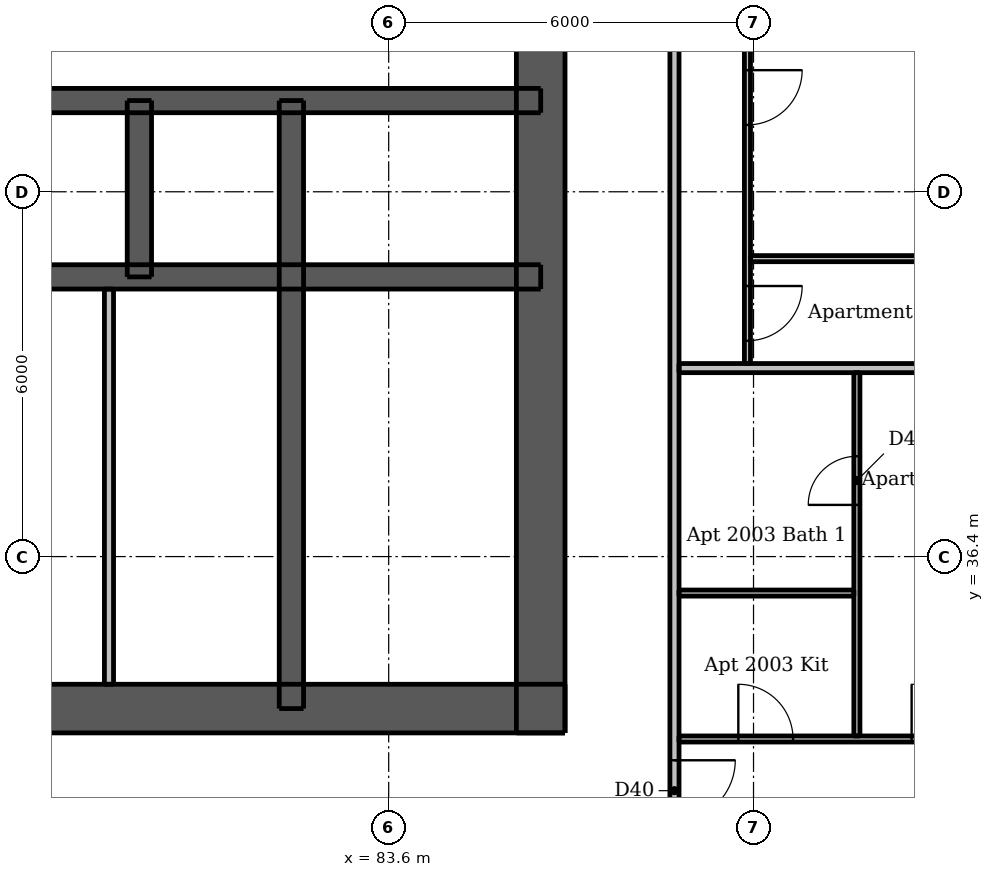
"""IFC4 building model, lengths in metres.
Left out: names, types, materials, properties, quantities, classifications, styles, units other than length and angle.
Written with IfcOpenShell. Run it as: python <this file> out.ifc"""

import sys

from ifc_helpers import new_model, si_unit, direction, frame, frame_2d, origin, place, context, subcontext, project, spatial, rectangle, extrude, element, fill, save


model = new_model("IFC4")
c1 = context("Model", 3, precision=1e-05, world=origin(), true_north=direction((0.0, 1.0)))
c2 = subcontext(c1, "Body", "Model", "MODEL_VIEW")
j1 = project(units=[si_unit("LENGTHUNIT", "METRE"), si_unit("PLANEANGLEUNIT", "RADIAN")], contexts=[c1])
p1 = place(None, origin())
s1 = spatial("IfcSite", under=j1, at=p1, CompositionType="ELEMENT")
p2 = place(p1, origin())
s2 = spatial("IfcBuilding", under=s1, at=p2, CompositionType="ELEMENT")
p3 = place(p2, frame((0.0, 0.0, 78.7)))
s3 = spatial("IfcBuildingStorey", under=s2, at=p3, CompositionType="ELEMENT", Elevation=78.7)
p4 = place(p3, frame((62.5, 33.9, 0.0), z_axis=(0.0, 0.0, 1.0), x_axis=(1.0, 0.0, 0.0)))
e1 = element("IfcWall", 1, at=p4, inside=s3, PredefinedType="SHEAR", context=c2, shape_type="SweptSolid", body=[
    extrude(rectangle(XDim=24.0, YDim=0.8, at=frame_2d((12.0, 0.0))), origin(), (0.0, 0.0, 1.0), 3.05),
])
p5 = place(p4, frame((2.0, 0.0, 0.0)))
e2 = element("IfcOpeningElement", 2, at=p5, cuts=e1, PredefinedType="OPENING", context=c2, shape_type="SweptSolid", body=[
    extrude(rectangle(XDim=1.1, YDim=2.1, at=frame_2d((0.55, 1.05))), frame((0.0, 0.41, 0.0), z_axis=(0.0, -1.0, 0.0), x_axis=(1.0, 0.0, 0.0)), (0.0, 0.0, 1.0), 0.82),
])
p6 = place(p4, frame((20.9, 0.0, 0.0)))
e3 = element("IfcOpeningElement", 3, at=p6, cuts=e1, PredefinedType="OPENING", context=c2, shape_type="SweptSolid", body=[
    extrude(rectangle(XDim=1.1, YDim=2.1, at=frame_2d((0.55, 1.05))), frame((0.0, 0.41, 0.0), z_axis=(0.0, -1.0, 0.0), x_axis=(1.0, 0.0, 0.0)), (0.0, 0.0, 1.0), 0.82),
])
p7 = place(p4, frame((8.0, 0.0, 0.0)))
e4 = element("IfcOpeningElement", 4, at=p7, cuts=e1, PredefinedType="OPENING", context=c2, shape_type="SweptSolid", body=[
    extrude(rectangle(XDim=1.1, YDim=2.1, at=frame_2d((0.55, 1.05))), frame((0.0, 0.41, 0.0), z_axis=(0.0, -1.0, 0.0), x_axis=(1.0, 0.0, 0.0)), (0.0, 0.0, 1.0), 0.82),
])
p8 = place(p4, frame((17.488, 0.0, 0.0)))
e5 = element("IfcOpeningElement", 5, at=p8, cuts=e1, PredefinedType="OPENING", context=c2, shape_type="SweptSolid", body=[
    extrude(rectangle(XDim=0.9, YDim=2.1, at=frame_2d((0.45, 1.05))), frame((0.0, 0.41, 0.0), z_axis=(0.0, -1.0, 0.0), x_axis=(1.0, 0.0, 0.0)), (0.0, 0.0, 1.0), 0.82),
])
p9 = place(p3, frame((86.1, 33.5, 0.0), z_axis=(0.0, 0.0, 1.0), x_axis=(0.0, 1.0, 0.0)))
e6 = element("IfcWall", 6, at=p9, inside=s3, PredefinedType="SHEAR", context=c2, shape_type="SweptSolid", body=[
    extrude(rectangle(XDim=24.0, YDim=0.8, at=frame_2d((12.0, 0.0))), origin(), (0.0, 0.0, 1.0), 3.05),
])
p10 = place(p9, frame((11.2, 0.0, 0.0)))
e7 = element("IfcOpeningElement", 7, at=p10, cuts=e6, PredefinedType="OPENING", context=c2, shape_type="SweptSolid", body=[
    extrude(rectangle(XDim=1.6, YDim=2.1, at=frame_2d((0.8, 1.05))), frame((0.0, 0.41, 0.0), z_axis=(0.0, -1.0, 0.0), x_axis=(1.0, 0.0, 0.0)), (0.0, 0.0, 1.0), 0.82),
])
p11 = place(p3, frame((62.9, 41.0, 0.0), z_axis=(0.0, 0.0, 1.0), x_axis=(1.0, 0.0, 0.0)))
e8 = element("IfcWall", 8, at=p11, inside=s3, PredefinedType="SHEAR", context=c2, shape_type="SweptSolid", body=[
    extrude(rectangle(XDim=23.2, YDim=0.4, at=frame_2d((11.6, 0.0))), origin(), (0.0, 0.0, 1.0), 3.05),
])
p12 = place(p3, frame((62.9, 43.9, 0.0), z_axis=(0.0, 0.0, 1.0), x_axis=(1.0, 0.0, 0.0)))
e9 = element("IfcWall", 9, at=p12, inside=s3, PredefinedType="SHEAR", context=c2, shape_type="SweptSolid", body=[
    extrude(rectangle(XDim=23.2, YDim=0.4, at=frame_2d((11.6, 0.0))), origin(), (0.0, 0.0, 1.0), 3.05),
])
p13 = place(p12, frame((0.825, 0.0, 0.0)))
e10 = element("IfcOpeningElement", 10, at=p13, cuts=e9, PredefinedType="OPENING", context=c2, shape_type="SweptSolid", body=[
    extrude(rectangle(XDim=0.9, YDim=2.1, at=frame_2d((0.45, 1.05))), frame((0.0, 0.21, 0.0), z_axis=(0.0, -1.0, 0.0), x_axis=(1.0, 0.0, 0.0)), (0.0, 0.0, 1.0), 0.42),
])
p14 = place(p12, frame((2.575, 0.0, 0.0)))
e11 = element("IfcOpeningElement", 11, at=p14, cuts=e9, PredefinedType="OPENING", context=c2, shape_type="SweptSolid", body=[
    extrude(rectangle(XDim=0.9, YDim=2.1, at=frame_2d((0.45, 1.05))), frame((0.0, 0.21, 0.0), z_axis=(0.0, -1.0, 0.0), x_axis=(1.0, 0.0, 0.0)), (0.0, 0.0, 1.0), 0.42),
])
p15 = place(p12, frame((20.6, 0.0, 0.0)))
e12 = element("IfcOpeningElement", 12, at=p15, cuts=e9, PredefinedType="OPENING", context=c2, shape_type="SweptSolid", body=[
    extrude(rectangle(XDim=0.9, YDim=2.1, at=frame_2d((0.45, 1.05))), frame((0.0, 0.21, 0.0), z_axis=(0.0, -1.0, 0.0), x_axis=(1.0, 0.0, 0.0)), (0.0, 0.0, 1.0), 0.42),
])
p16 = place(p12, frame((4.8, 0.0, 0.0)))
e13 = element("IfcOpeningElement", 13, at=p16, cuts=e9, PredefinedType="OPENING", context=c2, shape_type="SweptSolid", body=[
    extrude(rectangle(XDim=1.1, YDim=2.1, at=frame_2d((0.55, 1.05))), frame((0.0, 0.21, 0.0), z_axis=(0.0, -1.0, 0.0), x_axis=(1.0, 0.0, 0.0)), (0.0, 0.0, 1.0), 0.42),
])
p17 = place(p12, frame((7.3, 0.0, 0.0)))
e14 = element("IfcOpeningElement", 14, at=p17, cuts=e9, PredefinedType="OPENING", context=c2, shape_type="SweptSolid", body=[
    extrude(rectangle(XDim=1.1, YDim=2.1, at=frame_2d((0.55, 1.05))), frame((0.0, 0.21, 0.0), z_axis=(0.0, -1.0, 0.0), x_axis=(1.0, 0.0, 0.0)), (0.0, 0.0, 1.0), 0.42),
])
p18 = place(p12, frame((9.8, 0.0, 0.0)))
e15 = element("IfcOpeningElement", 15, at=p18, cuts=e9, PredefinedType="OPENING", context=c2, shape_type="SweptSolid", body=[
    extrude(rectangle(XDim=1.1, YDim=2.1, at=frame_2d((0.55, 1.05))), frame((0.0, 0.21, 0.0), z_axis=(0.0, -1.0, 0.0), x_axis=(1.0, 0.0, 0.0)), (0.0, 0.0, 1.0), 0.42),
])
p19 = place(p12, frame((12.3, 0.0, 0.0)))
e16 = element("IfcOpeningElement", 16, at=p19, cuts=e9, PredefinedType="OPENING", context=c2, shape_type="SweptSolid", body=[
    extrude(rectangle(XDim=1.1, YDim=2.1, at=frame_2d((0.55, 1.05))), frame((0.0, 0.21, 0.0), z_axis=(0.0, -1.0, 0.0), x_axis=(1.0, 0.0, 0.0)), (0.0, 0.0, 1.0), 0.42),
])
p20 = place(p12, frame((14.8, 0.0, 0.0)))
e17 = element("IfcOpeningElement", 17, at=p20, cuts=e9, PredefinedType="OPENING", context=c2, shape_type="SweptSolid", body=[
    extrude(rectangle(XDim=1.1, YDim=2.1, at=frame_2d((0.55, 1.05))), frame((0.0, 0.21, 0.0), z_axis=(0.0, -1.0, 0.0), x_axis=(1.0, 0.0, 0.0)), (0.0, 0.0, 1.0), 0.42),
])
p21 = place(p12, frame((17.3, 0.0, 0.0)))
e18 = element("IfcOpeningElement", 18, at=p21, cuts=e9, PredefinedType="OPENING", context=c2, shape_type="SweptSolid", body=[
    extrude(rectangle(XDim=1.1, YDim=2.1, at=frame_2d((0.55, 1.05))), frame((0.0, 0.21, 0.0), z_axis=(0.0, -1.0, 0.0), x_axis=(1.0, 0.0, 0.0)), (0.0, 0.0, 1.0), 0.42),
])
p22 = place(p3, frame((82.0, 33.9, 0.0), z_axis=(0.0, 0.0, 1.0), x_axis=(0.0, 1.0, 0.0)))
e19 = element("IfcWall", 19, at=p22, inside=s3, PredefinedType="SHEAR", context=c2, shape_type="SweptSolid", body=[
    extrude(rectangle(XDim=10.0, YDim=0.4, at=frame_2d((5.0, 0.0))), origin(), (0.0, 0.0, 1.0), 3.05),
])
p23 = place(p3, frame((79.5, 41.0, 0.0), z_axis=(0.0, 0.0, 1.0), x_axis=(0.0, 1.0, 0.0)))
e20 = element("IfcWall", 20, at=p23, inside=s3, PredefinedType="SHEAR", context=c2, shape_type="SweptSolid", body=[
    extrude(rectangle(XDim=2.9, YDim=0.4, at=frame_2d((1.45, 0.0))), origin(), (0.0, 0.0, 1.0), 3.05),
])
p24 = place(p3, frame((79.0, 34.3, 0.0), z_axis=(0.0, 0.0, 1.0), x_axis=(0.0, 1.0, 0.0)))
e21 = element("IfcWall", 21, at=p24, inside=s3, PredefinedType="PLUMBINGWALL", context=c2, shape_type="SweptSolid", body=[
    extrude(rectangle(XDim=6.5, YDim=0.15, at=frame_2d((3.25, 0.0))), origin(), (0.0, 0.0, 1.0), 3.05),
])
p25 = place(p3, frame((89.5, 59.35, 0.0), z_axis=(0.0, 0.0, 1.0), x_axis=(0.0, -1.0, 0.0)))
e22 = element("IfcWall", 22, at=p25, inside=s3, PredefinedType="PARTITIONING", context=c2, shape_type="SweptSolid", body=[
    extrude(rectangle(XDim=19.775, YDim=0.1, at=frame_2d((9.888, 0.0))), origin(), (0.0, 0.0, 1.0), 2.51),
])
p26 = place(p25, frame((14.95, 0.0, 0.0)))
e23 = element("IfcOpeningElement", 23, at=p26, cuts=e22, PredefinedType="OPENING", context=c2, shape_type="SweptSolid", body=[
    extrude(rectangle(XDim=0.9, YDim=2.1, at=frame_2d((0.45, 1.05))), frame((0.0, 0.06, 0.0), z_axis=(0.0, -1.0, 0.0), x_axis=(1.0, 0.0, 0.0)), (0.0, 0.0, 1.0), 0.12),
])
p27 = place(p25, frame((9.0, 0.0, 0.0)))
e24 = element("IfcOpeningElement", 24, at=p27, cuts=e22, PredefinedType="OPENING", context=c2, shape_type="SweptSolid", body=[
    extrude(rectangle(XDim=0.9, YDim=2.1, at=frame_2d((0.45, 1.05))), frame((0.0, 0.06, 0.0), z_axis=(0.0, -1.0, 0.0), x_axis=(1.0, 0.0, 0.0)), (0.0, 0.0, 1.0), 0.12),
])
p28 = place(p25, frame((11.4, 0.0, 0.0)))
e25 = element("IfcOpeningElement", 25, at=p28, cuts=e22, PredefinedType="OPENING", context=c2, shape_type="SweptSolid", body=[
    extrude(rectangle(XDim=0.9, YDim=2.1, at=frame_2d((0.45, 1.05))), frame((0.0, 0.06, 0.0), z_axis=(0.0, -1.0, 0.0), x_axis=(1.0, 0.0, 0.0)), (0.0, 0.0, 1.0), 0.12),
])
p29 = place(p25, frame((18.5, 0.0, 0.0)))
e26 = element("IfcOpeningElement", 26, at=p29, cuts=e22, PredefinedType="OPENING", context=c2, shape_type="SweptSolid", body=[
    extrude(rectangle(XDim=0.9, YDim=2.1, at=frame_2d((0.45, 1.05))), frame((0.0, 0.06, 0.0), z_axis=(0.0, -1.0, 0.0), x_axis=(1.0, 0.0, 0.0)), (0.0, 0.0, 1.0), 0.12),
])
p30 = place(p25, frame((6.0, 0.0, 0.0)))
e27 = element("IfcOpeningElement", 27, at=p30, cuts=e22, PredefinedType="OPENING", context=c2, shape_type="SweptSolid", body=[
    extrude(rectangle(XDim=0.9, YDim=2.1, at=frame_2d((0.45, 1.05))), frame((0.0, 0.06, 0.0), z_axis=(0.0, -1.0, 0.0), x_axis=(1.0, 0.0, 0.0)), (0.0, 0.0, 1.0), 0.12),
])
p31 = place(p25, frame((0.85, 0.0, 0.0)))
e28 = element("IfcOpeningElement", 28, at=p31, cuts=e22, PredefinedType="OPENING", context=c2, shape_type="SweptSolid", body=[
    extrude(rectangle(XDim=0.9, YDim=2.1, at=frame_2d((0.45, 1.05))), frame((0.0, 0.06, 0.0), z_axis=(0.0, -1.0, 0.0), x_axis=(1.0, 0.0, 0.0)), (0.0, 0.0, 1.0), 0.12),
])
p32 = place(p25, frame((3.35, 0.0, 0.0)))
e29 = element("IfcOpeningElement", 29, at=p32, cuts=e22, PredefinedType="OPENING", context=c2, shape_type="SweptSolid", body=[
    extrude(rectangle(XDim=0.8, YDim=2.1, at=frame_2d((0.4, 1.05))), frame((0.0, 0.06, 0.0), z_axis=(0.0, -1.0, 0.0), x_axis=(1.0, 0.0, 0.0)), (0.0, 0.0, 1.0), 0.12),
])
p33 = place(p3, frame((91.3, 33.45, 0.0), z_axis=(0.0, 0.0, 1.0), x_axis=(0.0, 1.0, 0.0)))
e30 = element("IfcWall", 30, at=p33, inside=s3, PredefinedType="PARTITIONING", context=c2, shape_type="SweptSolid", body=[
    extrude(rectangle(XDim=5.975, YDim=0.1, at=frame_2d((2.988, 0.0))), origin(), (0.0, 0.0, 1.0), 3.05),
])
p34 = place(p33, frame((3.8, 0.0, 0.0)))
e31 = element("IfcOpeningElement", 31, at=p34, cuts=e30, PredefinedType="OPENING", context=c2, shape_type="SweptSolid", body=[
    extrude(rectangle(XDim=0.8, YDim=2.1, at=frame_2d((0.4, 1.05))), frame((0.0, 0.06, 0.0), z_axis=(0.0, -1.0, 0.0), x_axis=(1.0, 0.0, 0.0)), (0.0, 0.0, 1.0), 0.12),
])
p35 = place(p3, frame((89.55, 41.3, 0.0), z_axis=(0.0, 0.0, 1.0), x_axis=(1.0, 0.0, 0.0)))
e32 = element("IfcWall", 32, at=p35, inside=s3, PredefinedType="PARTITIONING", context=c2, shape_type="SweptSolid", body=[
    extrude(rectangle(XDim=4.9, YDim=0.1, at=frame_2d((2.45, 0.0))), origin(), (0.0, 0.0, 1.0), 3.05),
])
p36 = place(p3, frame((88.375, 35.8, 0.0), z_axis=(0.0, 0.0, 1.0), x_axis=(1.0, 0.0, 0.0)))
e33 = element("IfcWall", 33, at=p36, inside=s3, PredefinedType="PARTITIONING", context=c2, shape_type="SweptSolid", body=[
    extrude(rectangle(XDim=2.875, YDim=0.1, at=frame_2d((1.438, 0.0))), origin(), (0.0, 0.0, 1.0), 3.05),
])
p37 = place(p3, frame((88.375, 33.4, 0.0), z_axis=(0.0, 0.0, 1.0), x_axis=(1.0, 0.0, 0.0)))
e34 = element("IfcWall", 34, at=p37, inside=s3, PredefinedType="PARTITIONING", context=c2, shape_type="SweptSolid", body=[
    extrude(rectangle(XDim=5.625, YDim=0.1, at=frame_2d((2.812, 0.0))), origin(), (0.0, 0.0, 1.0), 3.05),
])
p38 = place(p37, frame((0.975, 0.0, 0.0)))
e35 = element("IfcOpeningElement", 35, at=p38, cuts=e34, PredefinedType="OPENING", context=c2, shape_type="SweptSolid", body=[
    extrude(rectangle(XDim=0.9, YDim=2.1, at=frame_2d((0.45, 1.05))), frame((0.0, 0.06, 0.0), z_axis=(0.0, -1.0, 0.0), x_axis=(1.0, 0.0, 0.0)), (0.0, 0.0, 1.0), 0.12),
])
p39 = place(p37, frame((3.825, 0.0, 0.0)))
e36 = element("IfcOpeningElement", 36, at=p39, cuts=e34, PredefinedType="OPENING", context=c2, shape_type="SweptSolid", body=[
    extrude(rectangle(XDim=0.9, YDim=2.1, at=frame_2d((0.45, 1.05))), frame((0.0, 0.06, 0.0), z_axis=(0.0, -1.0, 0.0), x_axis=(1.0, 0.0, 0.0)), (0.0, 0.0, 1.0), 0.12),
])
p40 = place(p3, frame((88.3, 60.475, 0.0), z_axis=(0.0, 0.0, 1.0), x_axis=(0.0, -1.0, 0.0)))
e37 = element("IfcWall", 37, at=p40, inside=s3, PredefinedType="PARTITIONING", context=c2, shape_type="SweptSolid", body=[
    extrude(rectangle(XDim=28.7, YDim=0.15, at=frame_2d((14.35, 0.0))), origin(), (0.0, 0.0, 1.0), 3.05),
])
p41 = place(p40, frame((27.425, 0.0, 0.0)))
e38 = element("IfcOpeningElement", 38, at=p41, cuts=e37, PredefinedType="OPENING", context=c2, shape_type="SweptSolid", body=[
    extrude(rectangle(XDim=1.0, YDim=2.1, at=frame_2d((0.5, 1.05))), frame((0.0, 0.085, 0.0), z_axis=(0.0, -1.0, 0.0), x_axis=(1.0, 0.0, 0.0)), (0.0, 0.0, 1.0), 0.17),
])
p42 = place(p40, frame((10.575, 0.0, 0.0)))
e39 = element("IfcOpeningElement", 39, at=p42, cuts=e37, PredefinedType="OPENING", context=c2, shape_type="SweptSolid", body=[
    extrude(rectangle(XDim=1.0, YDim=2.1, at=frame_2d((0.5, 1.05))), frame((0.0, 0.085, 0.0), z_axis=(0.0, -1.0, 0.0), x_axis=(1.0, 0.0, 0.0)), (0.0, 0.0, 1.0), 0.17),
])
p43 = place(p3, frame((88.375, 39.5, 0.0), z_axis=(0.0, 0.0, 1.0), x_axis=(1.0, 0.0, 0.0)))
e40 = element("IfcWall", 40, at=p43, inside=s3, PredefinedType="PARTITIONING", context=c2, shape_type="SweptSolid", body=[
    extrude(rectangle(XDim=10.125, YDim=0.15, at=frame_2d((5.062, 0.0))), origin(), (0.0, 0.0, 1.0), 3.05),
])
p44 = place(p6, origin())
e41 = element("IfcDoor", 41, at=p44, inside=s3, OperationType="SINGLE_SWING_RIGHT", PredefinedType="DOOR", context=c2, shape_type="SweptSolid", body=[
    extrude(rectangle(XDim=1.1, YDim=2.1, at=frame_2d((0.55, 1.05))), frame((0.0, 0.388, 0.0), z_axis=(0.0, -1.0, 0.0), x_axis=(1.0, 0.0, 0.0)), (0.0, 0.0, 1.0), 0.05),
])
fill(e3, e41)
p45 = place(p8, origin())
e42 = element("IfcDoor", 42, at=p45, inside=s3, OperationType="SINGLE_SWING_LEFT", PredefinedType="DOOR", context=c2, shape_type="SweptSolid", body=[
    extrude(rectangle(XDim=0.9, YDim=2.1, at=frame_2d((0.45, 1.05))), frame((0.0, 0.388, 0.0), z_axis=(0.0, -1.0, 0.0), x_axis=(1.0, 0.0, 0.0)), (0.0, 0.0, 1.0), 0.05),
])
fill(e5, e42)
p46 = place(p15, origin())
e43 = element("IfcDoor", 43, at=p46, inside=s3, OperationType="SINGLE_SWING_LEFT", PredefinedType="DOOR", context=c2, shape_type="SweptSolid", body=[
    extrude(rectangle(XDim=0.9, YDim=2.1, at=frame_2d((0.45, 1.05))), frame((0.0, -0.138, 0.0), z_axis=(0.0, -1.0, 0.0), x_axis=(1.0, 0.0, 0.0)), (0.0, 0.0, 1.0), 0.05),
])
fill(e12, e43)
p47 = place(p20, origin())
e44 = element("IfcDoor", 44, at=p47, inside=s3, OperationType="DOUBLE_DOOR_SLIDING", PredefinedType="DOOR", context=c2, shape_type="SweptSolid", body=[
    extrude(rectangle(XDim=1.1, YDim=2.1, at=frame_2d((0.55, 1.05))), frame((0.0, 0.025, 0.0), z_axis=(0.0, -1.0, 0.0), x_axis=(1.0, 0.0, 0.0)), (0.0, 0.0, 1.0), 0.05),
])
fill(e17, e44)
p48 = place(p21, origin())
e45 = element("IfcDoor", 45, at=p48, inside=s3, OperationType="DOUBLE_DOOR_SLIDING", PredefinedType="DOOR", context=c2, shape_type="SweptSolid", body=[
    extrude(rectangle(XDim=1.1, YDim=2.1, at=frame_2d((0.55, 1.05))), frame((0.0, 0.025, 0.0), z_axis=(0.0, -1.0, 0.0), x_axis=(1.0, 0.0, 0.0)), (0.0, 0.0, 1.0), 0.05),
])
fill(e18, e45)
p49 = place(p41, origin())
e46 = element("IfcDoor", 46, at=p49, inside=s3, OperationType="SINGLE_SWING_LEFT", PredefinedType="DOOR", context=c2, shape_type="SweptSolid", body=[
    extrude(rectangle(XDim=1.0, YDim=2.1, at=frame_2d((0.5, 1.05))), frame((0.0, 0.025, 0.0), z_axis=(0.0, -1.0, 0.0), x_axis=(1.0, 0.0, 0.0)), (0.0, 0.0, 1.0), 0.05),
])
fill(e38, e46)
p50 = place(p38, origin())
e47 = element("IfcDoor", 47, at=p50, inside=s3, OperationType="SINGLE_SWING_LEFT", PredefinedType="DOOR", context=c2, shape_type="SweptSolid", body=[
    extrude(rectangle(XDim=0.9, YDim=2.1, at=frame_2d((0.45, 1.05))), frame((0.0, 0.025, 0.0), z_axis=(0.0, -1.0, 0.0), x_axis=(1.0, 0.0, 0.0)), (0.0, 0.0, 1.0), 0.05),
])
fill(e35, e47)
p51 = place(p39, origin())
e48 = element("IfcDoor", 48, at=p51, inside=s3, OperationType="SINGLE_SWING_LEFT", PredefinedType="DOOR", context=c2, shape_type="SweptSolid", body=[
    extrude(rectangle(XDim=0.9, YDim=2.1, at=frame_2d((0.45, 1.05))), frame((0.0, 0.025, 0.0), z_axis=(0.0, -1.0, 0.0), x_axis=(1.0, 0.0, 0.0)), (0.0, 0.0, 1.0), 0.05),
])
fill(e36, e48)
p52 = place(p34, origin())
e49 = element("IfcDoor", 49, at=p52, inside=s3, OperationType="SINGLE_SWING_LEFT", PredefinedType="DOOR", context=c2, shape_type="SweptSolid", body=[
    extrude(rectangle(XDim=0.8, YDim=2.1, at=frame_2d((0.4, 1.05))), frame((0.0, 0.025, 0.0), z_axis=(0.0, -1.0, 0.0), x_axis=(1.0, 0.0, 0.0)), (0.0, 0.0, 1.0), 0.05),
])
fill(e31, e49)
p53 = place(p26, origin())
e50 = element("IfcDoor", 50, at=p53, inside=s3, OperationType="SINGLE_SWING_LEFT", PredefinedType="DOOR", context=c2, shape_type="SweptSolid", body=[
    extrude(rectangle(XDim=0.9, YDim=2.1, at=frame_2d((0.45, 1.05))), frame((0.0, 0.025, 0.0), z_axis=(0.0, -1.0, 0.0), x_axis=(1.0, 0.0, 0.0)), (0.0, 0.0, 1.0), 0.05),
])
fill(e23, e50)
p54 = place(p29, origin())
e51 = element("IfcDoor", 51, at=p54, inside=s3, OperationType="SINGLE_SWING_LEFT", PredefinedType="DOOR", context=c2, shape_type="SweptSolid", body=[
    extrude(rectangle(XDim=0.9, YDim=2.1, at=frame_2d((0.45, 1.05))), frame((0.0, 0.025, 0.0), z_axis=(0.0, -1.0, 0.0), x_axis=(1.0, 0.0, 0.0)), (0.0, 0.0, 1.0), 0.05),
])
fill(e26, e51)
save(model, sys.argv[1])
